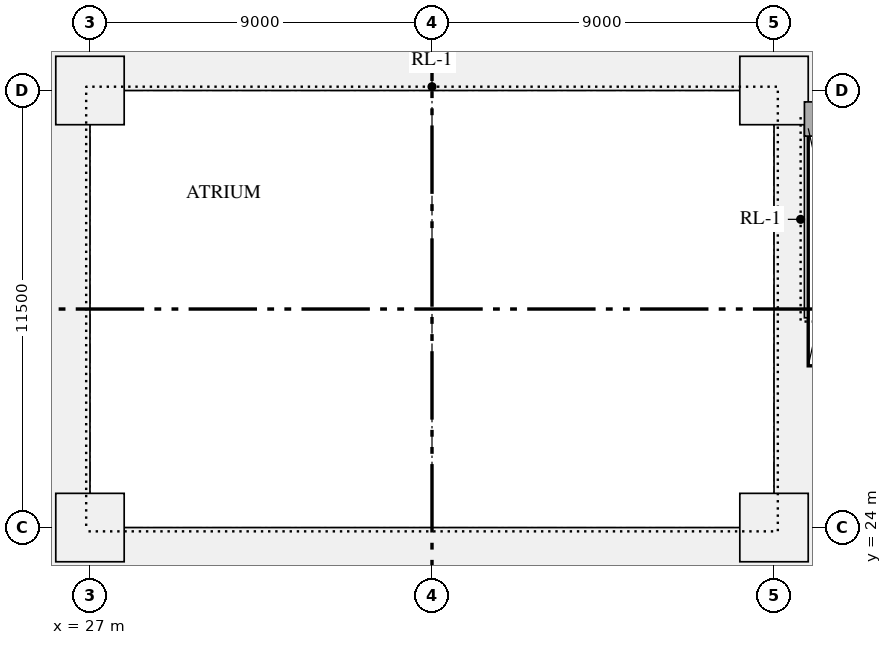
"""IFC4 building model, lengths in metres.
Left out: names, types, materials, properties, quantities, classifications, styles, units other than length and angle.
Written with IfcOpenShell. Run it as: python <this file> out.ifc"""

import sys

from ifc_helpers import new_model, si_unit, direction, frame, origin, origin_2d, place, context, subcontext, project, spatial, rectangle, extrude, element, save


model = new_model("IFC4")
c1 = context("Model", 3, precision=1e-05, world=origin(), true_north=direction((0.0, 1.0)))
c2 = subcontext(c1, "Body", "Model", "MODEL_VIEW")
j1 = project(units=[si_unit("LENGTHUNIT", "METRE"), si_unit("PLANEANGLEUNIT", "RADIAN")], contexts=[c1])
p1 = place(None, origin())
s1 = spatial("IfcSite", under=j1, at=p1, CompositionType="ELEMENT")
p2 = place(p1, origin())
s2 = spatial("IfcBuilding", under=s1, at=p2, CompositionType="ELEMENT")
p3 = place(p2, frame((0.0, 0.0, 11.0)))
s3 = spatial("IfcBuildingStorey", under=s2, at=p3, CompositionType="ELEMENT", Elevation=11.0)
for number, where, z_axis, x_axis in (
    (1, (27.0, 24.0, 0.0), (0.0, 0.0, 1.0), (1.0, 0.0, 0.0)),
    (2, (27.0, 35.5, 0.0), (0.0, 0.0, 1.0), (1.0, 0.0, 0.0)),
    (3, (45.0, 24.0, 0.0), (0.0, 0.0, 1.0), (1.0, 0.0, 0.0)),
    (4, (45.0, 35.5, 0.0), (0.0, 0.0, 1.0), (1.0, 0.0, 0.0)),
):
    element("IfcColumn", number, at=place(p3, frame(where, z_axis=z_axis, x_axis=x_axis)), inside=s3, PredefinedType="COLUMN", context=c2, shape_type="SweptSolid", body=[
        extrude(rectangle(XDim=1.8, YDim=1.8, at=origin_2d()), origin(), (0.0, 0.0, 1.0), 4.5),
    ])
save(model, sys.argv[1])
